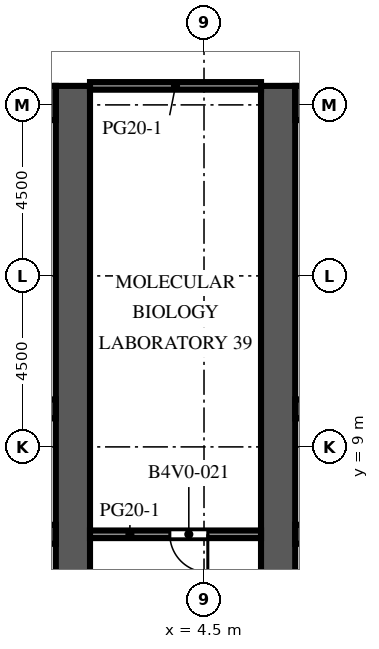
"""IFC4 building model, lengths in metres.
Left out: names, types, materials, properties, quantities, classifications, styles, units other than length and angle.
Written with IfcOpenShell. Run it as: python <this file> out.ifc"""

import sys

from ifc_helpers import new_model, si_unit, direction, frame, frame_2d, origin, place, context, subcontext, project, spatial, rectangle, extrude, element, fill, save


model = new_model("IFC4")
c1 = context("Model", 3, precision=1e-05, world=origin(), true_north=direction((0.0, 1.0)))
c2 = subcontext(c1, "Body", "Model", "MODEL_VIEW")
j1 = project(units=[si_unit("LENGTHUNIT", "METRE"), si_unit("PLANEANGLEUNIT", "RADIAN")], contexts=[c1])
p1 = place(None, origin())
s1 = spatial("IfcSite", under=j1, at=p1, CompositionType="ELEMENT")
p2 = place(p1, origin())
s2 = spatial("IfcBuilding", under=s1, at=p2, CompositionType="ELEMENT")
p3 = place(p2, frame((0.0, 0.0, 120.8)))
s3 = spatial("IfcBuildingStorey", under=s2, at=p3, CompositionType="ELEMENT", Elevation=120.8)
p4 = place(p3, frame((1.05, -9.0, 0.0), z_axis=(0.0, 0.0, 1.0), x_axis=(0.0, 1.0, 0.0)))
e1 = element("IfcWall", 1, at=p4, inside=s3, PredefinedType="SHEAR", context=c2, shape_type="SweptSolid", body=[
    extrude(rectangle(XDim=27.5, YDim=0.9, at=frame_2d((13.75, 0.0))), origin(), (0.0, 0.0, 1.0), 4.1),
])
p5 = place(p4, frame((12.55, 0.0, 0.0)))
e2 = element("IfcOpeningElement", 2, at=p5, cuts=e1, PredefinedType="OPENING", context=c2, shape_type="SweptSolid", body=[
    extrude(rectangle(XDim=2.4, YDim=2.4, at=frame_2d((1.2, 1.2))), frame((0.0, 0.46, 0.0), z_axis=(0.0, -1.0, 0.0), x_axis=(1.0, 0.0, 0.0)), (0.0, 0.0, 1.0), 0.92),
])
p6 = place(p4, frame((3.975, 0.0, 0.0)))
e3 = element("IfcOpeningElement", 3, at=p6, cuts=e1, PredefinedType="OPENING", context=c2, shape_type="SweptSolid", body=[
    extrude(rectangle(XDim=1.2, YDim=2.1, at=frame_2d((0.6, 1.05))), frame((0.0, 0.46, 0.0), z_axis=(0.0, -1.0, 0.0), x_axis=(1.0, 0.0, 0.0)), (0.0, 0.0, 1.0), 0.92),
])
p7 = place(p4, frame((19.485, 0.0, 0.0)))
e4 = element("IfcOpeningElement", 4, at=p7, cuts=e1, PredefinedType="OPENING", context=c2, shape_type="SweptSolid", body=[
    extrude(rectangle(XDim=1.0, YDim=2.1, at=frame_2d((0.5, 1.05))), frame((0.0, 0.46, 0.0), z_axis=(0.0, -1.0, 0.0), x_axis=(1.0, 0.0, 0.0)), (0.0, 0.0, 1.0), 0.92),
])
p8 = place(p4, frame((21.139, 0.0, 0.0)))
e5 = element("IfcOpeningElement", 5, at=p8, cuts=e1, PredefinedType="OPENING", context=c2, shape_type="SweptSolid", body=[
    extrude(rectangle(XDim=1.0, YDim=2.1, at=frame_2d((0.5, 1.05))), frame((0.0, 0.46, 0.0), z_axis=(0.0, -1.0, 0.0), x_axis=(1.0, 0.0, 0.0)), (0.0, 0.0, 1.0), 0.92),
])
p9 = place(p4, frame((23.16, 0.0, 0.0)))
e6 = element("IfcOpeningElement", 6, at=p9, cuts=e1, PredefinedType="OPENING", context=c2, shape_type="SweptSolid", body=[
    extrude(rectangle(XDim=1.0, YDim=2.1, at=frame_2d((0.5, 1.05))), frame((0.0, 0.46, 0.0), z_axis=(0.0, -1.0, 0.0), x_axis=(1.0, 0.0, 0.0)), (0.0, 0.0, 1.0), 0.92),
])
p10 = place(p4, frame((25.181, 0.0, 0.0)))
e7 = element("IfcOpeningElement", 7, at=p10, cuts=e1, PredefinedType="OPENING", context=c2, shape_type="SweptSolid", body=[
    extrude(rectangle(XDim=1.0, YDim=2.1, at=frame_2d((0.5, 1.05))), frame((0.0, 0.46, 0.0), z_axis=(0.0, -1.0, 0.0), x_axis=(1.0, 0.0, 0.0)), (0.0, 0.0, 1.0), 0.92),
])
p11 = place(p3, frame((-9.6, 18.05, 0.0), z_axis=(0.0, 0.0, 1.0), x_axis=(1.0, 0.0, 0.0)))
e8 = element("IfcWall", 8, at=p11, inside=s3, PredefinedType="SHEAR", context=c2, shape_type="SweptSolid", body=[
    extrude(rectangle(XDim=10.2, YDim=0.9, at=frame_2d((5.1, 0.0))), origin(), (0.0, 0.0, 1.0), 4.1),
])
p12 = place(p3, frame((-9.6, 6.7, 0.0), z_axis=(0.0, 0.0, 1.0), x_axis=(1.0, 0.0, 0.0)))
e9 = element("IfcWall", 9, at=p12, inside=s3, PredefinedType="SHEAR", context=c2, shape_type="SweptSolid", body=[
    extrude(rectangle(XDim=10.2, YDim=0.5, at=frame_2d((5.1, 0.0))), origin(), (0.0, 0.0, 1.0), 4.1),
])
p13 = place(p12, frame((0.562, 0.0, 0.0)))
e10 = element("IfcOpeningElement", 10, at=p13, cuts=e9, PredefinedType="OPENING", context=c2, shape_type="SweptSolid", body=[
    extrude(rectangle(XDim=1.1, YDim=2.1, at=frame_2d((0.55, 1.05))), frame((0.0, 0.26, 0.0), z_axis=(0.0, -1.0, 0.0), x_axis=(1.0, 0.0, 0.0)), (0.0, 0.0, 1.0), 0.52),
])
p14 = place(p12, frame((3.288, 0.0, 0.0)))
e11 = element("IfcOpeningElement", 11, at=p14, cuts=e9, PredefinedType="OPENING", context=c2, shape_type="SweptSolid", body=[
    extrude(rectangle(XDim=1.0, YDim=2.1, at=frame_2d((0.5, 1.05))), frame((0.0, 0.26, 0.0), z_axis=(0.0, -1.0, 0.0), x_axis=(1.0, 0.0, 0.0)), (0.0, 0.0, 1.0), 0.52),
])
p15 = place(p12, frame((5.913, 0.0, 0.0)))
e12 = element("IfcOpeningElement", 12, at=p15, cuts=e9, PredefinedType="OPENING", context=c2, shape_type="SweptSolid", body=[
    extrude(rectangle(XDim=1.0, YDim=2.1, at=frame_2d((0.5, 1.05))), frame((0.0, 0.26, 0.0), z_axis=(0.0, -1.0, 0.0), x_axis=(1.0, 0.0, 0.0)), (0.0, 0.0, 1.0), 0.52),
])
p16 = place(p12, frame((8.587, 0.0, 0.0)))
e13 = element("IfcOpeningElement", 13, at=p16, cuts=e9, PredefinedType="OPENING", context=c2, shape_type="SweptSolid", body=[
    extrude(rectangle(XDim=1.0, YDim=2.1, at=frame_2d((0.5, 1.05))), frame((0.0, 0.26, 0.0), z_axis=(0.0, -1.0, 0.0), x_axis=(1.0, 0.0, 0.0)), (0.0, 0.0, 1.0), 0.52),
])
p17 = place(p3, frame((-9.6, 10.0, 0.0), z_axis=(0.0, 0.0, 1.0), x_axis=(1.0, 0.0, 0.0)))
e14 = element("IfcWall", 14, at=p17, inside=s3, PredefinedType="SHEAR", context=c2, shape_type="SweptSolid", body=[
    extrude(rectangle(XDim=10.2, YDim=0.5, at=frame_2d((5.1, 0.0))), origin(), (0.0, 0.0, 1.0), 4.1),
])
p18 = place(p3, frame((6.45, -9.0, 0.0), z_axis=(0.0, 0.0, 1.0), x_axis=(0.0, 1.0, 0.0)))
e15 = element("IfcWall", 15, at=p18, inside=s3, PredefinedType="SHEAR", context=c2, shape_type="SweptSolid", body=[
    extrude(rectangle(XDim=27.5, YDim=0.9, at=frame_2d((13.75, 0.0))), origin(), (0.0, 0.0, 1.0), 4.1),
])
p19 = place(p18, frame((12.55, 0.0, 0.0)))
e16 = element("IfcOpeningElement", 16, at=p19, cuts=e15, PredefinedType="OPENING", context=c2, shape_type="SweptSolid", body=[
    extrude(rectangle(XDim=2.4, YDim=2.4, at=frame_2d((1.2, 1.2))), frame((0.0, 0.46, 0.0), z_axis=(0.0, -1.0, 0.0), x_axis=(1.0, 0.0, 0.0)), (0.0, 0.0, 1.0), 0.92),
])
p20 = place(p18, frame((3.975, 0.0, 0.0)))
e17 = element("IfcOpeningElement", 17, at=p20, cuts=e15, PredefinedType="OPENING", context=c2, shape_type="SweptSolid", body=[
    extrude(rectangle(XDim=1.2, YDim=2.1, at=frame_2d((0.6, 1.05))), frame((0.0, 0.46, 0.0), z_axis=(0.0, -1.0, 0.0), x_axis=(1.0, 0.0, 0.0)), (0.0, 0.0, 1.0), 0.92),
])
p21 = place(p18, frame((19.485, 0.0, 0.0)))
e18 = element("IfcOpeningElement", 18, at=p21, cuts=e15, PredefinedType="OPENING", context=c2, shape_type="SweptSolid", body=[
    extrude(rectangle(XDim=1.0, YDim=2.1, at=frame_2d((0.5, 1.05))), frame((0.0, 0.46, 0.0), z_axis=(0.0, -1.0, 0.0), x_axis=(1.0, 0.0, 0.0)), (0.0, 0.0, 1.0), 0.92),
])
p22 = place(p18, frame((21.139, 0.0, 0.0)))
e19 = element("IfcOpeningElement", 19, at=p22, cuts=e15, PredefinedType="OPENING", context=c2, shape_type="SweptSolid", body=[
    extrude(rectangle(XDim=1.0, YDim=2.1, at=frame_2d((0.5, 1.05))), frame((0.0, 0.46, 0.0), z_axis=(0.0, -1.0, 0.0), x_axis=(1.0, 0.0, 0.0)), (0.0, 0.0, 1.0), 0.92),
])
p23 = place(p18, frame((23.16, 0.0, 0.0)))
e20 = element("IfcOpeningElement", 20, at=p23, cuts=e15, PredefinedType="OPENING", context=c2, shape_type="SweptSolid", body=[
    extrude(rectangle(XDim=1.0, YDim=2.1, at=frame_2d((0.5, 1.05))), frame((0.0, 0.46, 0.0), z_axis=(0.0, -1.0, 0.0), x_axis=(1.0, 0.0, 0.0)), (0.0, 0.0, 1.0), 0.92),
])
p24 = place(p18, frame((25.181, 0.0, 0.0)))
e21 = element("IfcOpeningElement", 21, at=p24, cuts=e15, PredefinedType="OPENING", context=c2, shape_type="SweptSolid", body=[
    extrude(rectangle(XDim=1.0, YDim=2.1, at=frame_2d((0.5, 1.05))), frame((0.0, 0.46, 0.0), z_axis=(0.0, -1.0, 0.0), x_axis=(1.0, 0.0, 0.0)), (0.0, 0.0, 1.0), 0.92),
])
p25 = place(p3, frame((6.9, 18.05, 0.0), z_axis=(0.0, 0.0, 1.0), x_axis=(1.0, 0.0, 0.0)))
e22 = element("IfcWall", 22, at=p25, inside=s3, PredefinedType="SHEAR", context=c2, shape_type="SweptSolid", body=[
    extrude(rectangle(XDim=10.2, YDim=0.9, at=frame_2d((5.1, 0.0))), origin(), (0.0, 0.0, 1.0), 4.1),
])
p26 = place(p3, frame((6.9, 6.7, 0.0), z_axis=(0.0, 0.0, 1.0), x_axis=(1.0, 0.0, 0.0)))
e23 = element("IfcWall", 23, at=p26, inside=s3, PredefinedType="SHEAR", context=c2, shape_type="SweptSolid", body=[
    extrude(rectangle(XDim=10.2, YDim=0.5, at=frame_2d((5.1, 0.0))), origin(), (0.0, 0.0, 1.0), 4.1),
])
p27 = place(p26, frame((0.562, 0.0, 0.0)))
e24 = element("IfcOpeningElement", 24, at=p27, cuts=e23, PredefinedType="OPENING", context=c2, shape_type="SweptSolid", body=[
    extrude(rectangle(XDim=1.1, YDim=2.1, at=frame_2d((0.55, 1.05))), frame((0.0, 0.26, 0.0), z_axis=(0.0, -1.0, 0.0), x_axis=(1.0, 0.0, 0.0)), (0.0, 0.0, 1.0), 0.52),
])
p28 = place(p26, frame((3.288, 0.0, 0.0)))
e25 = element("IfcOpeningElement", 25, at=p28, cuts=e23, PredefinedType="OPENING", context=c2, shape_type="SweptSolid", body=[
    extrude(rectangle(XDim=1.0, YDim=2.1, at=frame_2d((0.5, 1.05))), frame((0.0, 0.26, 0.0), z_axis=(0.0, -1.0, 0.0), x_axis=(1.0, 0.0, 0.0)), (0.0, 0.0, 1.0), 0.52),
])
p29 = place(p26, frame((5.913, 0.0, 0.0)))
e26 = element("IfcOpeningElement", 26, at=p29, cuts=e23, PredefinedType="OPENING", context=c2, shape_type="SweptSolid", body=[
    extrude(rectangle(XDim=1.0, YDim=2.1, at=frame_2d((0.5, 1.05))), frame((0.0, 0.26, 0.0), z_axis=(0.0, -1.0, 0.0), x_axis=(1.0, 0.0, 0.0)), (0.0, 0.0, 1.0), 0.52),
])
p30 = place(p26, frame((8.587, 0.0, 0.0)))
e27 = element("IfcOpeningElement", 27, at=p30, cuts=e23, PredefinedType="OPENING", context=c2, shape_type="SweptSolid", body=[
    extrude(rectangle(XDim=1.0, YDim=2.1, at=frame_2d((0.5, 1.05))), frame((0.0, 0.26, 0.0), z_axis=(0.0, -1.0, 0.0), x_axis=(1.0, 0.0, 0.0)), (0.0, 0.0, 1.0), 0.52),
])
p31 = place(p3, frame((6.9, 10.0, 0.0), z_axis=(0.0, 0.0, 1.0), x_axis=(1.0, 0.0, 0.0)))
e28 = element("IfcWall", 28, at=p31, inside=s3, PredefinedType="SHEAR", context=c2, shape_type="SweptSolid", body=[
    extrude(rectangle(XDim=10.2, YDim=0.5, at=frame_2d((5.1, 0.0))), origin(), (0.0, 0.0, 1.0), 4.1),
])
for number, where, z_axis, x_axis in (
    (29, (-4.25, 11.72, 0.0), (0.0, 0.0, 1.0), (1.0, 0.0, 0.0)),
    (30, (-4.25, 13.558, 0.0), (0.0, 0.0, 1.0), (1.0, 0.0, 0.0)),
    (31, (-4.25, 15.762, 0.0), (0.0, 0.0, 1.0), (1.0, 0.0, 0.0)),
    (32, (6.9, 11.72, 0.0), (0.0, 0.0, 1.0), (1.0, 0.0, 0.0)),
    (33, (6.9, 13.558, 0.0), (0.0, 0.0, 1.0), (1.0, 0.0, 0.0)),
    (34, (6.9, 15.762, 0.0), (0.0, 0.0, 1.0), (1.0, 0.0, 0.0)),
):
    element("IfcWall", number, at=place(p3, frame(where, z_axis=z_axis, x_axis=x_axis)), inside=s3, PredefinedType="PARTITIONING", context=c2, shape_type="SweptSolid", body=[
        extrude(rectangle(XDim=4.85, YDim=0.1, at=frame_2d((2.425, 0.0))), origin(), (0.0, 0.0, 1.0), 3.65),
    ])
p32 = place(p3, frame((1.5, 6.7, 0.0), z_axis=(0.0, 0.0, 1.0), x_axis=(1.0, 0.0, 0.0)))
e35 = element("IfcWall", 35, at=p32, inside=s3, PredefinedType="PARTITIONING", context=c2, shape_type="SweptSolid", body=[
    extrude(rectangle(XDim=4.5, YDim=0.2, at=frame_2d((2.25, 0.0))), origin(), (0.0, 0.0, 1.0), 3.65),
])
p33 = place(p32, frame((2.1, 0.0, 0.0)))
e36 = element("IfcOpeningElement", 36, at=p33, cuts=e35, PredefinedType="OPENING", context=c2, shape_type="SweptSolid", body=[
    extrude(rectangle(XDim=1.0, YDim=2.1, at=frame_2d((0.5, 1.05))), frame((0.0, 0.11, 0.0), z_axis=(0.0, -1.0, 0.0), x_axis=(1.0, 0.0, 0.0)), (0.0, 0.0, 1.0), 0.22),
])
p34 = place(p3, frame((1.5, 18.5, 0.0), z_axis=(0.0, 0.0, 1.0), x_axis=(1.0, 0.0, 0.0)))
e37 = element("IfcWall", 37, at=p34, inside=s3, PredefinedType="PARTITIONING", context=c2, shape_type="SweptSolid", body=[
    extrude(rectangle(XDim=4.5, YDim=0.2, at=frame_2d((2.25, 0.0))), origin(), (0.0, 0.0, 1.0), 3.65),
])
p35 = place(p5, origin())
e38 = element("IfcDoor", 38, at=p35, inside=s3, OperationType="DOUBLE_DOOR_DOUBLE_SWING", PredefinedType="DOOR", context=c2, shape_type="SweptSolid", body=[
    extrude(rectangle(XDim=2.4, YDim=2.4, at=frame_2d((1.2, 1.2))), frame((0.0, 0.025, 0.0), z_axis=(0.0, -1.0, 0.0), x_axis=(1.0, 0.0, 0.0)), (0.0, 0.0, 1.0), 0.05),
])
fill(e2, e38)
p36 = place(p19, origin())
e39 = element("IfcDoor", 39, at=p36, inside=s3, OperationType="DOUBLE_DOOR_DOUBLE_SWING", PredefinedType="DOOR", context=c2, shape_type="SweptSolid", body=[
    extrude(rectangle(XDim=2.4, YDim=2.4, at=frame_2d((1.2, 1.2))), frame((0.0, 0.025, 0.0), z_axis=(0.0, -1.0, 0.0), x_axis=(1.0, 0.0, 0.0)), (0.0, 0.0, 1.0), 0.05),
])
fill(e16, e39)
p37 = place(p7, origin())
e40 = element("IfcDoor", 40, at=p37, inside=s3, OperationType="SINGLE_SWING_LEFT", PredefinedType="DOOR", context=c2, shape_type="SweptSolid", body=[
    extrude(rectangle(XDim=1.0, YDim=2.1, at=frame_2d((0.5, 1.05))), frame((0.0, 0.425, 0.0), z_axis=(0.0, -1.0, 0.0), x_axis=(1.0, 0.0, 0.0)), (0.0, 0.0, 1.0), 0.05),
])
fill(e4, e40)
p38 = place(p8, origin())
e41 = element("IfcDoor", 41, at=p38, inside=s3, OperationType="SINGLE_SWING_RIGHT", PredefinedType="DOOR", context=c2, shape_type="SweptSolid", body=[
    extrude(rectangle(XDim=1.0, YDim=2.1, at=frame_2d((0.5, 1.05))), frame((0.0, 0.425, 0.0), z_axis=(0.0, -1.0, 0.0), x_axis=(1.0, 0.0, 0.0)), (0.0, 0.0, 1.0), 0.05),
])
fill(e5, e41)
p39 = place(p9, origin())
e42 = element("IfcDoor", 42, at=p39, inside=s3, OperationType="SINGLE_SWING_LEFT", PredefinedType="DOOR", context=c2, shape_type="SweptSolid", body=[
    extrude(rectangle(XDim=1.0, YDim=2.1, at=frame_2d((0.5, 1.05))), frame((0.0, 0.425, 0.0), z_axis=(0.0, -1.0, 0.0), x_axis=(1.0, 0.0, 0.0)), (0.0, 0.0, 1.0), 0.05),
])
fill(e6, e42)
p40 = place(p10, origin())
e43 = element("IfcDoor", 43, at=p40, inside=s3, OperationType="SINGLE_SWING_RIGHT", PredefinedType="DOOR", context=c2, shape_type="SweptSolid", body=[
    extrude(rectangle(XDim=1.0, YDim=2.1, at=frame_2d((0.5, 1.05))), frame((0.0, 0.425, 0.0), z_axis=(0.0, -1.0, 0.0), x_axis=(1.0, 0.0, 0.0)), (0.0, 0.0, 1.0), 0.05),
])
fill(e7, e43)
p41 = place(p21, origin())
e44 = element("IfcDoor", 44, at=p41, inside=s3, OperationType="SINGLE_SWING_RIGHT", PredefinedType="DOOR", context=c2, shape_type="SweptSolid", body=[
    extrude(rectangle(XDim=1.0, YDim=2.1, at=frame_2d((0.5, 1.05))), frame((0.0, -0.375, 0.0), z_axis=(0.0, -1.0, 0.0), x_axis=(1.0, 0.0, 0.0)), (0.0, 0.0, 1.0), 0.05),
])
fill(e18, e44)
p42 = place(p22, origin())
e45 = element("IfcDoor", 45, at=p42, inside=s3, OperationType="SINGLE_SWING_LEFT", PredefinedType="DOOR", context=c2, shape_type="SweptSolid", body=[
    extrude(rectangle(XDim=1.0, YDim=2.1, at=frame_2d((0.5, 1.05))), frame((0.0, -0.375, 0.0), z_axis=(0.0, -1.0, 0.0), x_axis=(1.0, 0.0, 0.0)), (0.0, 0.0, 1.0), 0.05),
])
fill(e19, e45)
p43 = place(p23, origin())
e46 = element("IfcDoor", 46, at=p43, inside=s3, OperationType="SINGLE_SWING_RIGHT", PredefinedType="DOOR", context=c2, shape_type="SweptSolid", body=[
    extrude(rectangle(XDim=1.0, YDim=2.1, at=frame_2d((0.5, 1.05))), frame((0.0, -0.375, 0.0), z_axis=(0.0, -1.0, 0.0), x_axis=(1.0, 0.0, 0.0)), (0.0, 0.0, 1.0), 0.05),
])
fill(e20, e46)
p44 = place(p24, origin())
e47 = element("IfcDoor", 47, at=p44, inside=s3, OperationType="SINGLE_SWING_LEFT", PredefinedType="DOOR", context=c2, shape_type="SweptSolid", body=[
    extrude(rectangle(XDim=1.0, YDim=2.1, at=frame_2d((0.5, 1.05))), frame((0.0, -0.375, 0.0), z_axis=(0.0, -1.0, 0.0), x_axis=(1.0, 0.0, 0.0)), (0.0, 0.0, 1.0), 0.05),
])
fill(e21, e47)
p45 = place(p33, origin())
e48 = element("IfcDoor", 48, at=p45, inside=s3, OperationType="SINGLE_SWING_RIGHT", PredefinedType="DOOR", context=c2, shape_type="SweptSolid", body=[
    extrude(rectangle(XDim=1.0, YDim=2.1, at=frame_2d((0.5, 1.05))), frame((0.0, 0.025, 0.0), z_axis=(0.0, -1.0, 0.0), x_axis=(1.0, 0.0, 0.0)), (0.0, 0.0, 1.0), 0.05),
])
fill(e36, e48)
save(model, sys.argv[1])
